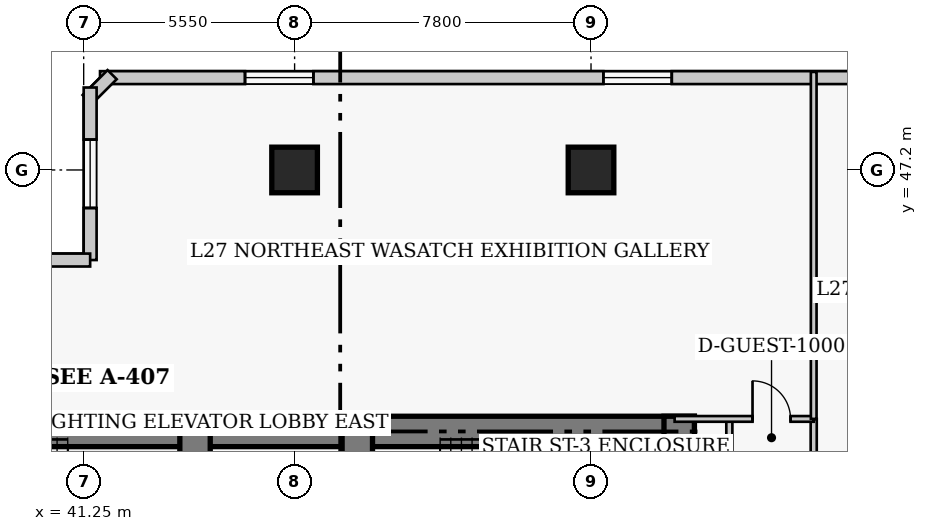
"""IFC4 building model, lengths in metres.
Left out: names, types, materials, properties, quantities, classifications, styles, units other than length and angle.
Written with IfcOpenShell. Run it as: python <this file> out.ifc"""

import sys

from ifc_helpers import new_model, si_unit, direction, frame, frame_2d, origin, origin_2d, place, context, subcontext, project, spatial, rectangle, extrude, element, fill, save


model = new_model("IFC4")
c1 = context("Model", 3, precision=1e-05, world=origin(), true_north=direction((0.0, 1.0)))
c2 = subcontext(c1, "Body", "Model", "MODEL_VIEW")
j1 = project(units=[si_unit("LENGTHUNIT", "METRE"), si_unit("PLANEANGLEUNIT", "RADIAN")], contexts=[c1])
p1 = place(None, origin())
s1 = spatial("IfcSite", under=j1, at=p1, CompositionType="ELEMENT")
p2 = place(p1, origin())
s2 = spatial("IfcBuilding", under=s1, at=p2, CompositionType="ELEMENT")
p3 = place(p2, frame((0.0, 0.0, 110.8)))
s3 = spatial("IfcBuildingStorey", under=s2, at=p3, CompositionType="ELEMENT", Elevation=110.8)
p4 = place(p3, frame((35.85, 40.32, 0.0), z_axis=(0.0, 0.0, 1.0), x_axis=(1.0, 0.0, 0.0)))
e1 = element("IfcWall", 1, at=p4, inside=s3, PredefinedType="SHEAR", context=c2, shape_type="SweptSolid", body=[
    extrude(rectangle(XDim=12.6, YDim=0.8, at=frame_2d((6.3, 0.0))), origin(), (0.0, 0.0, 1.0), 3.8),
])
p5 = place(p3, frame((48.45, 40.32, 0.0), z_axis=(0.0, 0.0, 1.0), x_axis=(1.0, 0.0, 0.0)))
e2 = element("IfcWall", 2, at=p5, inside=s3, PredefinedType="SHEAR", context=c2, shape_type="SweptSolid", body=[
    extrude(rectangle(XDim=8.87, YDim=0.8, at=frame_2d((4.435, 0.0))), origin(), (0.0, 0.0, 1.0), 3.8),
])
p6 = place(p3, frame((56.92, 27.05, 0.0), z_axis=(0.0, 0.0, 1.0), x_axis=(0.0, 1.0, 0.0)))
e3 = element("IfcWall", 3, at=p6, inside=s3, PredefinedType="SHEAR", context=c2, shape_type="SweptSolid", body=[
    extrude(rectangle(XDim=13.67, YDim=0.8, at=frame_2d((6.835, 0.0))), origin(), (0.0, 0.0, 1.0), 3.8),
])
p7 = place(p3, frame((44.18, 36.37, 0.0), z_axis=(0.0, 0.0, 1.0), x_axis=(0.0, 1.0, 0.0)))
e4 = element("IfcWall", 4, at=p7, inside=s3, PredefinedType="SHEAR", context=c2, shape_type="SweptSolid", body=[
    extrude(rectangle(XDim=3.95, YDim=0.8, at=frame_2d((1.975, 0.0))), origin(), (0.0, 0.0, 1.0), 3.8),
])
p8 = place(p3, frame((48.45, 32.35, 0.0), z_axis=(0.0, 0.0, 1.0), x_axis=(0.0, 1.0, 0.0)))
e5 = element("IfcWall", 5, at=p8, inside=s3, PredefinedType="SHEAR", context=c2, shape_type="SweptSolid", body=[
    extrude(rectangle(XDim=7.97, YDim=0.8, at=frame_2d((3.985, 0.0))), origin(), (0.0, 0.0, 1.0), 3.8),
])
p9 = place(p8, frame((5.85, 0.0, 0.0)))
e6 = element("IfcOpeningElement", 6, at=p9, cuts=e5, PredefinedType="OPENING", context=c2, shape_type="SweptSolid", body=[
    extrude(rectangle(XDim=1.1, YDim=2.15, at=frame_2d((0.55, 1.075))), frame((0.0, 0.41, 0.0), z_axis=(0.0, -1.0, 0.0), x_axis=(1.0, 0.0, 0.0)), (0.0, 0.0, 1.0), 0.82),
])
for number, where, z_axis, x_axis in (
    (7, (46.8, 47.2, 0.0), (0.0, 0.0, 1.0), (1.0, 0.0, 0.0)),
    (8, (54.6, 47.2, 0.0), (0.0, 0.0, 1.0), (1.0, 0.0, 0.0)),
):
    element("IfcColumn", number, at=place(p3, frame(where, z_axis=z_axis, x_axis=x_axis)), inside=s3, PredefinedType="COLUMN", context=c2, shape_type="SweptSolid", body=[
        extrude(rectangle(XDim=1.2, YDim=1.2, at=origin_2d()), origin(), (0.0, 0.0, 1.0), 3.8),
    ])
p10 = place(p3, frame((69.97, 49.63, 0.0), z_axis=(0.0, 0.0, 1.0), x_axis=(-1.0, 0.0, 0.0)))
e9 = element("IfcWall", 9, at=p10, inside=s3, PredefinedType="SOLIDWALL", context=c2, shape_type="SweptSolid", body=[
    extrude(rectangle(XDim=28.29, YDim=0.34, at=frame_2d((14.145, 0.0))), origin(), (0.0, 0.0, 1.0), 3.54),
])
p11 = place(p10, frame((3.815, 0.0, 0.85)))
e10 = element("IfcOpeningElement", 10, at=p11, cuts=e9, PredefinedType="OPENING", context=c2, shape_type="SweptSolid", body=[
    extrude(rectangle(XDim=1.8, YDim=1.8, at=frame_2d((0.9, 0.9))), frame((0.0, 0.18, 0.0), z_axis=(0.0, -1.0, 0.0), x_axis=(1.0, 0.0, 0.0)), (0.0, 0.0, 1.0), 0.36),
])
p12 = place(p10, frame((13.245, 0.0, 0.85)))
e11 = element("IfcOpeningElement", 11, at=p12, cuts=e9, PredefinedType="OPENING", context=c2, shape_type="SweptSolid", body=[
    extrude(rectangle(XDim=1.8, YDim=1.8, at=frame_2d((0.9, 0.9))), frame((0.0, 0.18, 0.0), z_axis=(0.0, -1.0, 0.0), x_axis=(1.0, 0.0, 0.0)), (0.0, 0.0, 1.0), 0.36),
])
p13 = place(p10, frame((22.675, 0.0, 0.85)))
e12 = element("IfcOpeningElement", 12, at=p13, cuts=e9, PredefinedType="OPENING", context=c2, shape_type="SweptSolid", body=[
    extrude(rectangle(XDim=1.8, YDim=1.8, at=frame_2d((0.9, 0.9))), frame((0.0, 0.18, 0.0), z_axis=(0.0, -1.0, 0.0), x_axis=(1.0, 0.0, 0.0)), (0.0, 0.0, 1.0), 0.36),
])
p14 = place(p3, frame((41.999, 49.708, 0.0), z_axis=(0.0, 0.0, 1.0), x_axis=(-0.707238225886, -0.706975312048, 0.0)))
e13 = element("IfcWall", 13, at=p14, inside=s3, PredefinedType="SOLIDWALL", context=c2, shape_type="SweptSolid", body=[
    extrude(rectangle(XDim=0.929, YDim=0.34, at=frame_2d((0.464, 0.0))), origin(), (0.0, 0.0, 1.0), 3.54),
])
p15 = place(p3, frame((41.42, 49.37, 0.0), z_axis=(0.0, 0.0, 1.0), x_axis=(0.0, -1.0, 0.0)))
e14 = element("IfcWall", 14, at=p15, inside=s3, PredefinedType="SOLIDWALL", context=c2, shape_type="SweptSolid", body=[
    extrude(rectangle(XDim=4.54, YDim=0.34, at=frame_2d((2.27, 0.0))), origin(), (0.0, 0.0, 1.0), 3.54),
])
p16 = place(p15, frame((1.37, 0.0, 0.85)))
e15 = element("IfcOpeningElement", 15, at=p16, cuts=e14, PredefinedType="OPENING", context=c2, shape_type="SweptSolid", body=[
    extrude(rectangle(XDim=1.8, YDim=1.8, at=frame_2d((0.9, 0.9))), frame((0.0, 0.18, 0.0), z_axis=(0.0, -1.0, 0.0), x_axis=(1.0, 0.0, 0.0)), (0.0, 0.0, 1.0), 0.36),
])
p17 = place(p3, frame((41.42, 44.83, 0.0), z_axis=(0.0, 0.0, 1.0), x_axis=(-1.0, 0.0, 0.0)))
e16 = element("IfcWall", 16, at=p17, inside=s3, PredefinedType="SOLIDWALL", context=c2, shape_type="SweptSolid", body=[
    extrude(rectangle(XDim=4.84, YDim=0.34, at=frame_2d((2.42, 0.0))), origin(), (0.0, 0.0, 1.0), 3.54),
])
p18 = place(p17, frame((1.52, 0.0, 0.85)))
e17 = element("IfcOpeningElement", 17, at=p18, cuts=e16, PredefinedType="OPENING", context=c2, shape_type="SweptSolid", body=[
    extrude(rectangle(XDim=1.8, YDim=1.8, at=frame_2d((0.9, 0.9))), frame((0.0, 0.18, 0.0), z_axis=(0.0, -1.0, 0.0), x_axis=(1.0, 0.0, 0.0)), (0.0, 0.0, 1.0), 0.36),
])
p19 = place(p3, frame((60.46, 11.85, 0.0), z_axis=(0.0, 0.0, 1.0), x_axis=(0.0, 1.0, 0.0)))
e18 = element("IfcWall", 18, at=p19, inside=s3, PredefinedType="PARTITIONING", context=c2, shape_type="SweptSolid", body=[
    extrude(rectangle(XDim=28.8, YDim=0.16, at=frame_2d((14.4, 0.0))), origin(), (0.0, 0.0, 1.0), 3.54),
])
p20 = place(p19, frame((3.6, 0.0, 0.0)))
e19 = element("IfcOpeningElement", 19, at=p20, cuts=e18, PredefinedType="OPENING", context=c2, shape_type="SweptSolid", body=[
    extrude(rectangle(XDim=0.95, YDim=2.1, at=frame_2d((0.475, 1.05))), frame((0.0, 0.09, 0.0), z_axis=(0.0, -1.0, 0.0), x_axis=(1.0, 0.0, 0.0)), (0.0, 0.0, 1.0), 0.18),
])
p21 = place(p19, frame((12.075, 0.0, 0.0)))
e20 = element("IfcOpeningElement", 20, at=p21, cuts=e18, PredefinedType="OPENING", context=c2, shape_type="SweptSolid", body=[
    extrude(rectangle(XDim=0.95, YDim=2.1, at=frame_2d((0.475, 1.05))), frame((0.0, 0.09, 0.0), z_axis=(0.0, -1.0, 0.0), x_axis=(1.0, 0.0, 0.0)), (0.0, 0.0, 1.0), 0.18),
])
p22 = place(p19, frame((19.875, 0.0, 0.0)))
e21 = element("IfcOpeningElement", 21, at=p22, cuts=e18, PredefinedType="OPENING", context=c2, shape_type="SweptSolid", body=[
    extrude(rectangle(XDim=0.95, YDim=2.1, at=frame_2d((0.475, 1.05))), frame((0.0, 0.09, 0.0), z_axis=(0.0, -1.0, 0.0), x_axis=(1.0, 0.0, 0.0)), (0.0, 0.0, 1.0), 0.18),
])
p23 = place(p19, frame((24.3, 0.0, 0.0)))
e22 = element("IfcOpeningElement", 22, at=p23, cuts=e18, PredefinedType="OPENING", context=c2, shape_type="SweptSolid", body=[
    extrude(rectangle(XDim=1.0, YDim=2.15, at=frame_2d((0.5, 1.075))), frame((0.0, 0.09, 0.0), z_axis=(0.0, -1.0, 0.0), x_axis=(1.0, 0.0, 0.0)), (0.0, 0.0, 1.0), 0.18),
])
p24 = place(p3, frame((58.24, 26.36, 0.0), z_axis=(0.0, 0.0, 1.0), x_axis=(0.0, 1.0, 0.0)))
e23 = element("IfcWall", 23, at=p24, inside=s3, PredefinedType="PARTITIONING", context=c2, shape_type="SweptSolid", body=[
    extrude(rectangle(XDim=14.29, YDim=0.16, at=frame_2d((7.145, 0.0))), origin(), (0.0, 0.0, 1.0), 3.54),
])
p25 = place(p3, frame((56.8, 40.65, 0.0), z_axis=(0.0, 0.0, 1.0), x_axis=(1.0, 0.0, 0.0)))
e24 = element("IfcWall", 24, at=p25, inside=s3, PredefinedType="PARTITIONING", context=c2, shape_type="SweptSolid", body=[
    extrude(rectangle(XDim=3.66, YDim=0.15, at=frame_2d((1.83, 0.0))), origin(), (0.0, 0.0, 1.0), 3.54),
])
p26 = place(p25, frame((2.05, 0.0, 0.0)))
e25 = element("IfcOpeningElement", 25, at=p26, cuts=e24, PredefinedType="OPENING", context=c2, shape_type="SweptSolid", body=[
    extrude(rectangle(XDim=1.0, YDim=2.15, at=frame_2d((0.5, 1.075))), frame((0.0, 0.085, 0.0), z_axis=(0.0, -1.0, 0.0), x_axis=(1.0, 0.0, 0.0)), (0.0, 0.0, 1.0), 0.17),
])
p27 = place(p3, frame((60.46, 40.65, 0.0), z_axis=(0.0, 0.0, 1.0), x_axis=(0.0, 1.0, 0.0)))
e26 = element("IfcWall", 26, at=p27, inside=s3, PredefinedType="PARTITIONING", context=c2, shape_type="SweptSolid", body=[
    extrude(rectangle(XDim=9.13, YDim=0.15, at=frame_2d((4.565, 0.0))), origin(), (0.0, 0.0, 1.0), 3.54),
])
p28 = place(p12, origin())
e27 = element("IfcWindow", 27, at=p28, inside=s3, PartitioningType="SINGLE_PANEL", PredefinedType="WINDOW", context=c2, shape_type="SweptSolid", body=[
    extrude(rectangle(XDim=1.8, YDim=1.8, at=frame_2d((0.9, 0.9))), frame((0.0, 0.03, 0.0), z_axis=(0.0, -1.0, 0.0), x_axis=(1.0, 0.0, 0.0)), (0.0, 0.0, 1.0), 0.06),
])
fill(e11, e27)
p29 = place(p13, origin())
e28 = element("IfcWindow", 28, at=p29, inside=s3, PartitioningType="SINGLE_PANEL", PredefinedType="WINDOW", context=c2, shape_type="SweptSolid", body=[
    extrude(rectangle(XDim=1.8, YDim=1.8, at=frame_2d((0.9, 0.9))), frame((0.0, 0.03, 0.0), z_axis=(0.0, -1.0, 0.0), x_axis=(1.0, 0.0, 0.0)), (0.0, 0.0, 1.0), 0.06),
])
fill(e12, e28)
p30 = place(p16, origin())
e29 = element("IfcWindow", 29, at=p30, inside=s3, PartitioningType="SINGLE_PANEL", PredefinedType="WINDOW", context=c2, shape_type="SweptSolid", body=[
    extrude(rectangle(XDim=1.8, YDim=1.8, at=frame_2d((0.9, 0.9))), frame((0.0, 0.03, 0.0), z_axis=(0.0, -1.0, 0.0), x_axis=(1.0, 0.0, 0.0)), (0.0, 0.0, 1.0), 0.06),
])
fill(e15, e29)
p31 = place(p26, origin())
e30 = element("IfcDoor", 30, at=p31, inside=s3, OperationType="SINGLE_SWING_LEFT", PredefinedType="DOOR", context=c2, shape_type="SweptSolid", body=[
    extrude(rectangle(XDim=1.0, YDim=2.15, at=frame_2d((0.5, 1.075))), frame((0.0, 0.025, 0.0), z_axis=(0.0, -1.0, 0.0), x_axis=(1.0, 0.0, 0.0)), (0.0, 0.0, 1.0), 0.05),
])
fill(e25, e30)
save(model, sys.argv[1])
